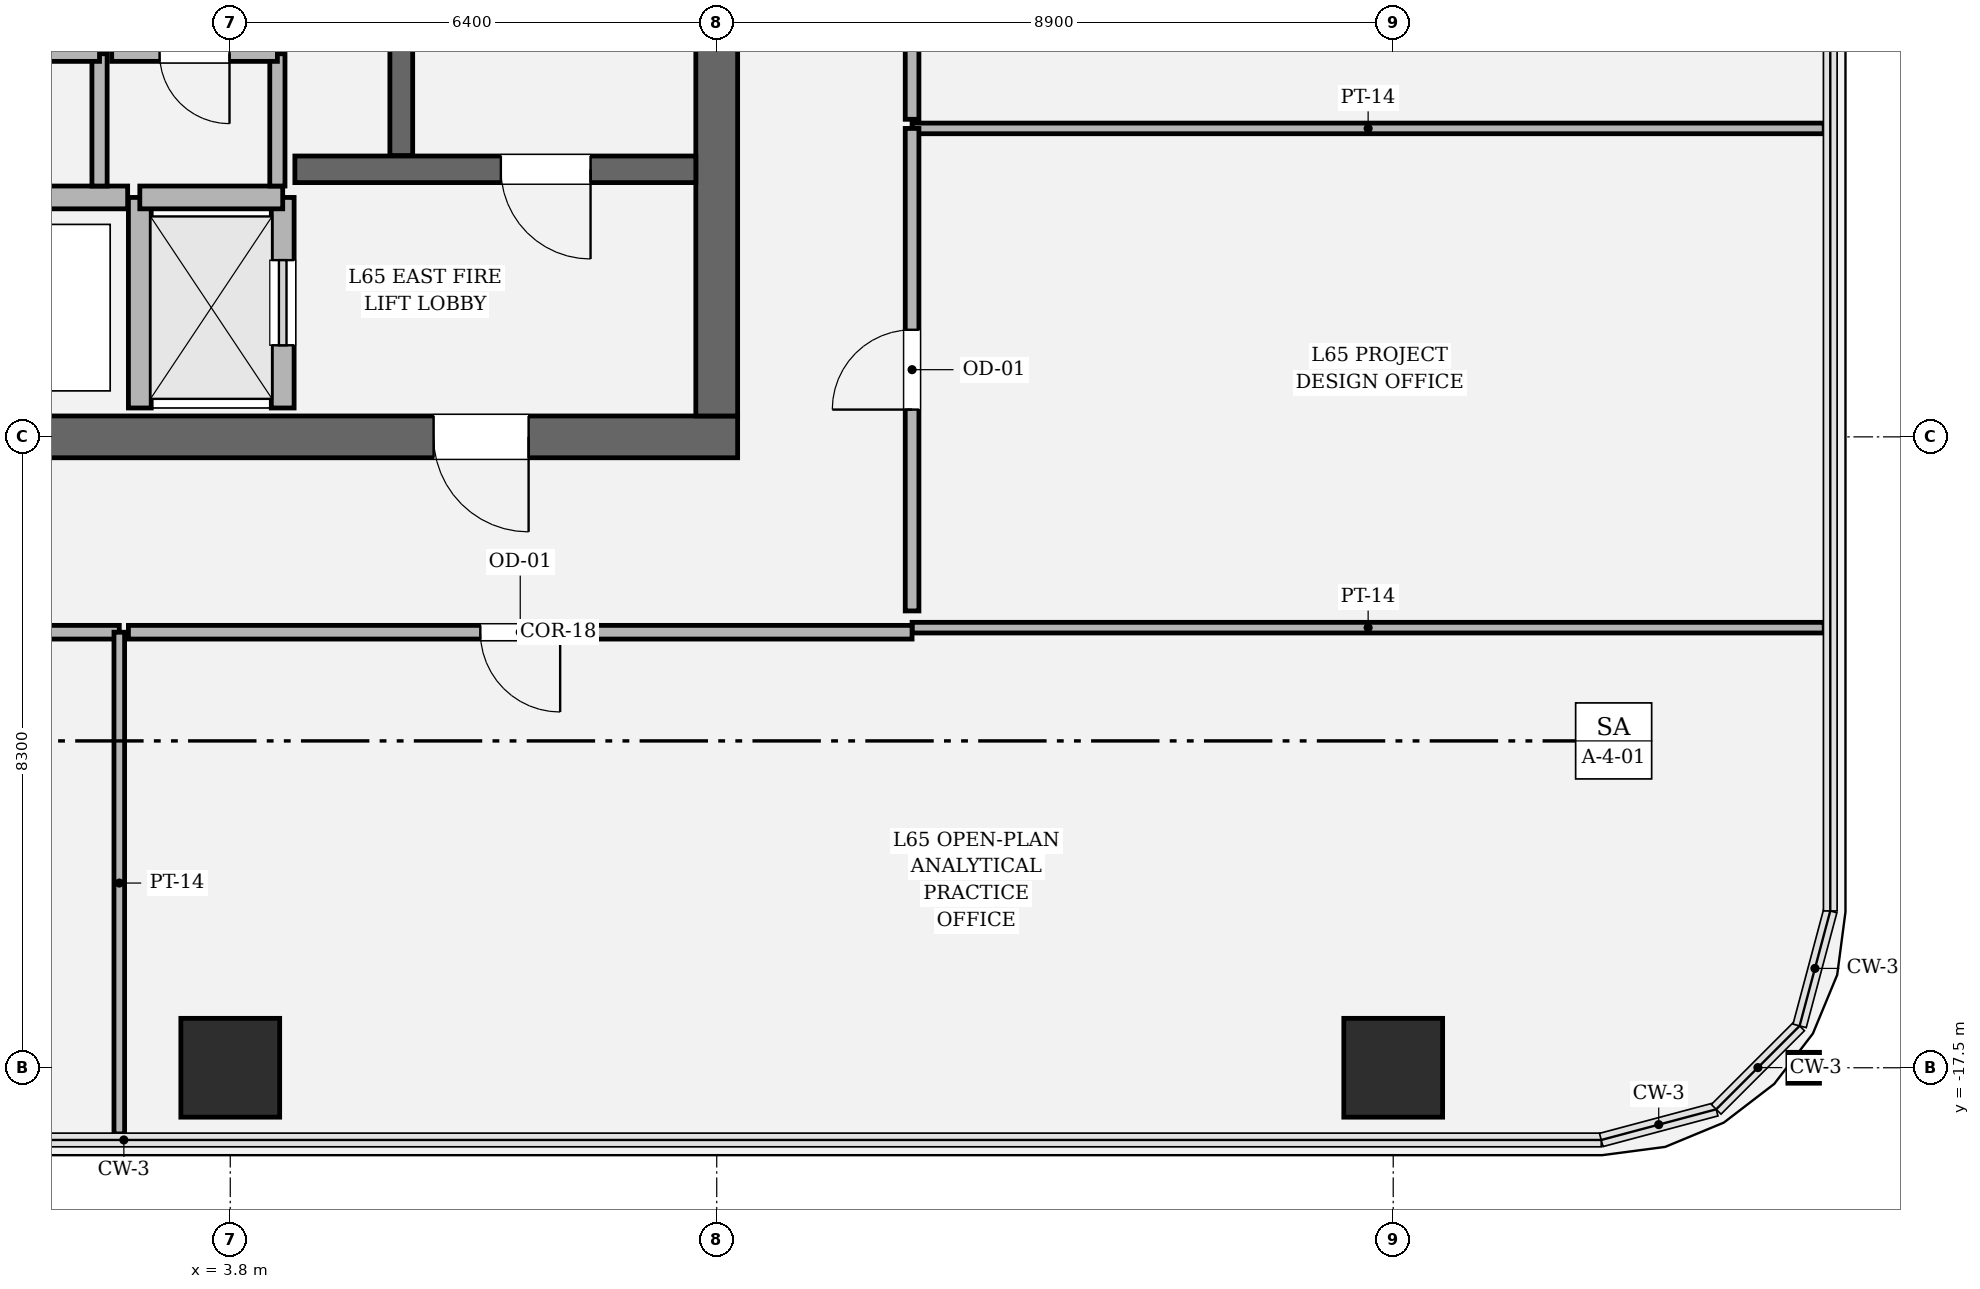
"""IFC4 building model, lengths in metres.
Left out: names, types, materials, properties, quantities, classifications, styles, units other than length and angle.
Written with IfcOpenShell. Run it as: python <this file> out.ifc"""

import sys

from ifc_helpers import new_model, si_unit, direction, frame, frame_2d, origin, origin_2d, place, context, subcontext, project, spatial, rectangle, hollow_rectangle, i_section, extrude, element, fill, save


model = new_model("IFC4")
c1 = context("Model", 3, precision=1e-05, world=origin(), true_north=direction((0.0, 1.0)))
c2 = subcontext(c1, "Body", "Model", "MODEL_VIEW")
j1 = project(units=[si_unit("LENGTHUNIT", "METRE"), si_unit("PLANEANGLEUNIT", "RADIAN")], contexts=[c1])
p1 = place(None, origin())
s1 = spatial("IfcSite", under=j1, at=p1, CompositionType="ELEMENT")
p2 = place(p1, origin())
s2 = spatial("IfcBuilding", under=s1, at=p2, CompositionType="ELEMENT")
p3 = place(p2, frame((0.0, 0.0, 275.7)))
s3 = spatial("IfcBuildingStorey", under=s2, at=p3, CompositionType="ELEMENT", Elevation=275.7)
p4 = place(p3, frame((10.475, -9.2, 0.0), z_axis=(0.0, 0.0, 1.0), x_axis=(-1.0, 0.0, 0.0)))
e1 = element("IfcWall", 1, at=p4, inside=s3, PredefinedType="SHEAR", context=c2, shape_type="SweptSolid", body=[
    extrude(rectangle(XDim=20.95, YDim=0.55, at=frame_2d((10.475, 0.0))), origin(), (0.0, 0.0, 1.0), 4.05),
])
p5 = place(p4, frame((2.75, 0.0, 0.0)))
e2 = element("IfcOpeningElement", 2, at=p5, cuts=e1, PredefinedType="OPENING", context=c2, shape_type="SweptSolid", body=[
    extrude(rectangle(XDim=1.25, YDim=2.25, at=frame_2d((0.625, 1.125))), frame((0.0, 0.285, 0.0), z_axis=(0.0, -1.0, 0.0), x_axis=(1.0, 0.0, 0.0)), (0.0, 0.0, 1.0), 0.57),
])
p6 = place(p4, frame((16.95, 0.0, 0.0)))
e3 = element("IfcOpeningElement", 3, at=p6, cuts=e1, PredefinedType="OPENING", context=c2, shape_type="SweptSolid", body=[
    extrude(rectangle(XDim=1.25, YDim=2.25, at=frame_2d((0.625, 1.125))), frame((0.0, 0.285, 0.0), z_axis=(0.0, -1.0, 0.0), x_axis=(1.0, 0.0, 0.0)), (0.0, 0.0, 1.0), 0.57),
])
p7 = place(p3, frame((10.2, 8.925, 0.0), z_axis=(0.0, 0.0, 1.0), x_axis=(0.0, -1.0, 0.0)))
e4 = element("IfcWall", 4, at=p7, inside=s3, PredefinedType="SHEAR", context=c2, shape_type="SweptSolid", body=[
    extrude(rectangle(XDim=17.85, YDim=0.55, at=frame_2d((8.925, 0.0))), origin(), (0.0, 0.0, 1.0), 4.05),
])
p8 = place(p7, frame((3.955, 0.0, 0.0)))
e5 = element("IfcOpeningElement", 5, at=p8, cuts=e4, PredefinedType="OPENING", context=c2, shape_type="SweptSolid", body=[
    extrude(rectangle(XDim=1.18, YDim=2.2, at=frame_2d((0.59, 1.1))), frame((0.0, 0.285, 0.0), z_axis=(0.0, -1.0, 0.0), x_axis=(1.0, 0.0, 0.0)), (0.0, 0.0, 1.0), 0.57),
])
p9 = place(p3, frame((6.05, 3.45, 0.0), z_axis=(0.0, 0.0, 1.0), x_axis=(0.0, -1.0, 0.0)))
e6 = element("IfcWall", 6, at=p9, inside=s3, PredefinedType="SOLIDWALL", context=c2, shape_type="SweptSolid", body=[
    extrude(rectangle(XDim=8.95, YDim=0.3, at=frame_2d((4.475, 0.0))), origin(), (0.0, 0.0, 1.0), 4.05),
])
p10 = place(p3, frame((4.65, -5.68, 0.0), z_axis=(0.0, 0.0, 1.0), x_axis=(1.0, 0.0, 0.0)))
e7 = element("IfcWall", 7, at=p10, inside=s3, PredefinedType="SOLIDWALL", context=c2, shape_type="SweptSolid", body=[
    extrude(rectangle(XDim=5.275, YDim=0.35, at=frame_2d((2.638, 0.0))), origin(), (0.0, 0.0, 1.0), 4.05),
])
p11 = place(p10, frame((2.71, 0.0, 0.0)))
e8 = element("IfcOpeningElement", 8, at=p11, cuts=e7, PredefinedType="OPENING", context=c2, shape_type="SweptSolid", body=[
    extrude(rectangle(XDim=1.18, YDim=2.2, at=frame_2d((0.59, 1.1))), frame((0.0, 0.185, 0.0), z_axis=(0.0, -1.0, 0.0), x_axis=(1.0, 0.0, 0.0)), (0.0, 0.0, 1.0), 0.37),
])
for number, where, z_axis, x_axis in (
    (9, (3.8, -17.5, 0.0), (0.0, 0.0, 1.0), (1.0, 0.0, 0.0)),
    (10, (19.1, -17.5, 0.0), (0.0, 0.0, 1.0), (1.0, 0.0, 0.0)),
):
    element("IfcColumn", number, at=place(p3, frame(where, z_axis=z_axis, x_axis=x_axis)), inside=s3, PredefinedType="COLUMN", context=c2, shape_type="SweptSolid", body=[
        extrude(hollow_rectangle(XDim=1.3, YDim=1.3, WallThickness=0.038, at=origin_2d()), origin(), (0.0, 0.0, 1.0), 4.05),
    ])
p12 = place(p3, frame((24.5, -17.5, 0.0), z_axis=(0.0, 0.0, 1.0), x_axis=(0.0, 1.0, 0.0)))
e11 = element("IfcColumn", 11, at=p12, inside=s3, PredefinedType="COLUMN", context=c2, shape_type="SweptSolid", body=[
    extrude(i_section(OverallWidth=0.406, OverallDepth=0.416, WebThickness=0.029, FlangeThickness=0.048, FilletRadius=0.018, at=origin_2d()), origin(), (0.0, 0.0, 1.0), 4.048),
])
p13 = place(p3, frame((4.49, -8.82, 0.0), z_axis=(0.0, 0.0, 1.0), x_axis=(0.0, 1.0, 0.0)))
e12 = element("IfcWall", 12, at=p13, inside=s3, PredefinedType="SOLIDWALL", context=c2, shape_type="SweptSolid", body=[
    extrude(rectangle(XDim=2.77, YDim=0.3, at=frame_2d((1.385, 0.0))), origin(), (0.0, 0.0, 1.0), 3.85),
])
p14 = place(p13, frame((0.825, 0.0, 0.0)))
e13 = element("IfcOpeningElement", 13, at=p14, cuts=e12, PredefinedType="OPENING", context=c2, shape_type="SweptSolid", body=[
    extrude(rectangle(XDim=1.12, YDim=2.25, at=frame_2d((0.56, 1.125))), frame((0.0, 0.16, 0.0), z_axis=(0.0, -1.0, 0.0), x_axis=(1.0, 0.0, 0.0)), (0.0, 0.0, 1.0), 0.32),
])
p15 = place(p3, frame((2.61, -8.82, 0.0), z_axis=(0.0, 0.0, 1.0), x_axis=(0.0, 1.0, 0.0)))
e14 = element("IfcWall", 14, at=p15, inside=s3, PredefinedType="SOLIDWALL", context=c2, shape_type="SweptSolid", body=[
    extrude(rectangle(XDim=2.77, YDim=0.3, at=frame_2d((1.385, 0.0))), origin(), (0.0, 0.0, 1.0), 3.85),
])
p16 = place(p3, frame((2.61, -6.05, 0.0), z_axis=(0.0, 0.0, 1.0), x_axis=(1.0, 0.0, 0.0)))
e15 = element("IfcWall", 15, at=p16, inside=s3, PredefinedType="SOLIDWALL", context=c2, shape_type="SweptSolid", body=[
    extrude(rectangle(XDim=1.88, YDim=0.3, at=frame_2d((0.94, 0.0))), origin(), (0.0, 0.0, 1.0), 3.85),
])
p17 = place(p3, frame((-2.45, -6.05, 0.0), z_axis=(0.0, 0.0, 1.0), x_axis=(1.0, 0.0, 0.0)))
e16 = element("IfcWall", 16, at=p17, inside=s3, PredefinedType="SOLIDWALL", context=c2, shape_type="SweptSolid", body=[
    extrude(rectangle(XDim=4.9, YDim=0.3, at=frame_2d((2.45, 0.0))), origin(), (0.0, 0.0, 1.0), 3.85),
])
p18 = place(p3, frame((2.08, -5.9, 0.0), z_axis=(0.0, 0.0, 1.0), x_axis=(0.0, 1.0, 0.0)))
e17 = element("IfcWall", 17, at=p18, inside=s3, PredefinedType="SOLIDWALL", context=c2, shape_type="SweptSolid", body=[
    extrude(rectangle(XDim=1.74, YDim=0.2, at=frame_2d((0.87, 0.0))), origin(), (0.0, 0.0, 1.0), 3.85),
])
p19 = place(p3, frame((2.08, -4.16, 0.0), z_axis=(0.0, 0.0, 1.0), x_axis=(-1.0, 0.0, 0.0)))
e18 = element("IfcWall", 18, at=p19, inside=s3, PredefinedType="SOLIDWALL", context=c2, shape_type="SweptSolid", body=[
    extrude(rectangle(XDim=3.17, YDim=0.2, at=frame_2d((1.585, 0.0))), origin(), (0.0, 0.0, 1.0), 3.85),
])
p20 = place(p19, frame((1.11, 0.0, 0.0)))
e19 = element("IfcOpeningElement", 19, at=p20, cuts=e18, PredefinedType="OPENING", context=c2, shape_type="SweptSolid", body=[
    extrude(rectangle(XDim=0.95, YDim=2.15, at=frame_2d((0.475, 1.075))), frame((0.0, 0.11, 0.0), z_axis=(0.0, -1.0, 0.0), x_axis=(1.0, 0.0, 0.0)), (0.0, 0.0, 1.0), 0.22),
])
p21 = place(p3, frame((4.42, -5.9, 0.0), z_axis=(0.0, 0.0, 1.0), x_axis=(0.0, 1.0, 0.0)))
e20 = element("IfcWall", 20, at=p21, inside=s3, PredefinedType="SOLIDWALL", context=c2, shape_type="SweptSolid", body=[
    extrude(rectangle(XDim=1.74, YDim=0.2, at=frame_2d((0.87, 0.0))), origin(), (0.0, 0.0, 1.0), 3.85),
])
p22 = place(p3, frame((4.42, -4.16, 0.0), z_axis=(0.0, 0.0, 1.0), x_axis=(-1.0, 0.0, 0.0)))
e21 = element("IfcWall", 21, at=p22, inside=s3, PredefinedType="SOLIDWALL", context=c2, shape_type="SweptSolid", body=[
    extrude(rectangle(XDim=2.18, YDim=0.2, at=frame_2d((1.09, 0.0))), origin(), (0.0, 0.0, 1.0), 3.85),
])
p23 = place(p22, frame((0.63, 0.0, 0.0)))
e22 = element("IfcOpeningElement", 22, at=p23, cuts=e21, PredefinedType="OPENING", context=c2, shape_type="SweptSolid", body=[
    extrude(rectangle(XDim=0.92, YDim=2.1, at=frame_2d((0.46, 1.05))), frame((0.0, 0.11, 0.0), z_axis=(0.0, -1.0, 0.0), x_axis=(1.0, 0.0, 0.0)), (0.0, 0.0, 1.0), 0.22),
])
p24 = place(p3, frame((-12.77, -11.77, 0.0), z_axis=(0.0, 0.0, 1.0), x_axis=(1.0, 0.0, 0.0)))
e23 = element("IfcWall", 23, at=p24, inside=s3, PredefinedType="PARTITIONING", context=c2, shape_type="SweptSolid", body=[
    extrude(rectangle(XDim=15.11, YDim=0.18, at=frame_2d((7.555, 0.0))), origin(), (0.0, 0.0, 1.0), 3.244),
])
p25 = place(p24, frame((7.03, 0.0, 0.0)))
e24 = element("IfcOpeningElement", 24, at=p25, cuts=e23, PredefinedType="OPENING", context=c2, shape_type="SweptSolid", body=[
    extrude(rectangle(XDim=1.05, YDim=2.2, at=frame_2d((0.525, 1.1))), frame((0.0, 0.1, 0.0), z_axis=(0.0, -1.0, 0.0), x_axis=(1.0, 0.0, 0.0)), (0.0, 0.0, 1.0), 0.2),
])
p26 = place(p3, frame((2.34, -11.77, 0.0), z_axis=(0.0, 0.0, 1.0), x_axis=(0.0, -1.0, 0.0)))
e25 = element("IfcWall", 25, at=p26, inside=s3, PredefinedType="PARTITIONING", context=c2, shape_type="SweptSolid", body=[
    extrude(rectangle(XDim=6.6, YDim=0.14, at=frame_2d((3.3, 0.0))), origin(), (0.0, 0.0, 1.0), 3.244),
])
p27 = place(p3, frame((12.77, -11.71, 0.0), z_axis=(0.0, 0.0, 1.0), x_axis=(1.0, 0.0, 0.0)))
e26 = element("IfcWall", 26, at=p27, inside=s3, PredefinedType="PARTITIONING", context=c2, shape_type="SweptSolid", body=[
    extrude(rectangle(XDim=12.0, YDim=0.14, at=frame_2d((6.0, 0.0))), origin(), (0.0, 0.0, 1.0), 2.564),
])
p28 = place(p3, frame((2.46, -11.77, 0.0), z_axis=(0.0, 0.0, 1.0), x_axis=(1.0, 0.0, 0.0)))
e27 = element("IfcWall", 27, at=p28, inside=s3, PredefinedType="PARTITIONING", context=c2, shape_type="SweptSolid", body=[
    extrude(rectangle(XDim=10.31, YDim=0.18, at=frame_2d((5.155, 0.0))), origin(), (0.0, 0.0, 1.0), 3.244),
])
p29 = place(p28, frame((4.63, 0.0, 0.0)))
e28 = element("IfcOpeningElement", 28, at=p29, cuts=e27, PredefinedType="OPENING", context=c2, shape_type="SweptSolid", body=[
    extrude(rectangle(XDim=1.05, YDim=2.2, at=frame_2d((0.525, 1.1))), frame((0.0, 0.1, 0.0), z_axis=(0.0, -1.0, 0.0), x_axis=(1.0, 0.0, 0.0)), (0.0, 0.0, 1.0), 0.2),
])
p30 = place(p3, frame((12.77, -5.142, 0.0), z_axis=(0.0, 0.0, 1.0), x_axis=(1.0, 0.0, 0.0)))
e29 = element("IfcWall", 29, at=p30, inside=s3, PredefinedType="PARTITIONING", context=c2, shape_type="SweptSolid", body=[
    extrude(rectangle(XDim=12.0, YDim=0.14, at=frame_2d((6.0, 0.0))), origin(), (0.0, 0.0, 1.0), 2.564),
])
p31 = place(p3, frame((12.77, -11.49, 0.0), z_axis=(0.0, 0.0, 1.0), x_axis=(0.0, 1.0, 0.0)))
e30 = element("IfcWall", 30, at=p31, inside=s3, PredefinedType="PARTITIONING", context=c2, shape_type="SweptSolid", body=[
    extrude(rectangle(XDim=6.348, YDim=0.18, at=frame_2d((3.174, 0.0))), origin(), (0.0, 0.0, 1.0), 3.244),
])
p32 = place(p31, frame((2.649, 0.0, 0.0)))
e31 = element("IfcOpeningElement", 31, at=p32, cuts=e30, PredefinedType="OPENING", context=c2, shape_type="SweptSolid", body=[
    extrude(rectangle(XDim=1.05, YDim=2.2, at=frame_2d((0.525, 1.1))), frame((0.0, 0.1, 0.0), z_axis=(0.0, -1.0, 0.0), x_axis=(1.0, 0.0, 0.0)), (0.0, 0.0, 1.0), 0.2),
])
p33 = place(p3, frame((12.77, -5.022, 0.0), z_axis=(0.0, 0.0, 1.0), x_axis=(0.0, 1.0, 0.0)))
e32 = element("IfcWall", 32, at=p33, inside=s3, PredefinedType="PARTITIONING", context=c2, shape_type="SweptSolid", body=[
    extrude(rectangle(XDim=4.962, YDim=0.18, at=frame_2d((2.481, 0.0))), origin(), (0.0, 0.0, 1.0), 3.244),
])
p34 = place(p33, frame((1.956, 0.0, 0.0)))
e33 = element("IfcOpeningElement", 33, at=p34, cuts=e32, PredefinedType="OPENING", context=c2, shape_type="SweptSolid", body=[
    extrude(rectangle(XDim=1.05, YDim=2.2, at=frame_2d((0.525, 1.1))), frame((0.0, 0.1, 0.0), z_axis=(0.0, -1.0, 0.0), x_axis=(1.0, 0.0, 0.0)), (0.0, 0.0, 1.0), 0.2),
])
p35 = place(p11, origin())
e34 = element("IfcDoor", 34, at=p35, inside=s3, OperationType="SINGLE_SWING_RIGHT", PredefinedType="DOOR", context=c2, shape_type="SweptSolid", body=[
    extrude(rectangle(XDim=1.18, YDim=2.2, at=frame_2d((0.59, 1.1))), frame((0.0, 0.025, 0.0), z_axis=(0.0, -1.0, 0.0), x_axis=(1.0, 0.0, 0.0)), (0.0, 0.0, 1.0), 0.05),
])
fill(e8, e34)
p36 = place(p5, origin())
e35 = element("IfcDoor", 35, at=p36, inside=s3, OperationType="SINGLE_SWING_LEFT", PredefinedType="DOOR", context=c2, shape_type="SweptSolid", body=[
    extrude(rectangle(XDim=1.25, YDim=2.25, at=frame_2d((0.625, 1.125))), frame((0.0, 0.025, 0.0), z_axis=(0.0, -1.0, 0.0), x_axis=(1.0, 0.0, 0.0)), (0.0, 0.0, 1.0), 0.05),
])
fill(e2, e35)
p37 = place(p14, origin())
e36 = element("IfcDoor", 36, at=p37, inside=s3, OperationType="SLIDING_TO_RIGHT", PredefinedType="DOOR", context=c2, shape_type="SweptSolid", body=[
    extrude(rectangle(XDim=1.12, YDim=2.25, at=frame_2d((0.56, 1.125))), frame((0.0, 0.025, 0.0), z_axis=(0.0, -1.0, 0.0), x_axis=(1.0, 0.0, 0.0)), (0.0, 0.0, 1.0), 0.05),
])
fill(e13, e36)
p38 = place(p23, origin())
e37 = element("IfcDoor", 37, at=p38, inside=s3, OperationType="SINGLE_SWING_LEFT", PredefinedType="DOOR", context=c2, shape_type="SweptSolid", body=[
    extrude(rectangle(XDim=0.92, YDim=2.1, at=frame_2d((0.46, 1.05))), frame((0.0, 0.025, 0.0), z_axis=(0.0, -1.0, 0.0), x_axis=(1.0, 0.0, 0.0)), (0.0, 0.0, 1.0), 0.05),
])
fill(e22, e37)
p39 = place(p29, origin())
e38 = element("IfcDoor", 38, at=p39, inside=s3, OperationType="SINGLE_SWING_RIGHT", PredefinedType="DOOR", context=c2, shape_type="SweptSolid", body=[
    extrude(rectangle(XDim=1.05, YDim=2.2, at=frame_2d((0.525, 1.1))), frame((0.0, 0.025, 0.0), z_axis=(0.0, -1.0, 0.0), x_axis=(1.0, 0.0, 0.0)), (0.0, 0.0, 1.0), 0.05),
])
fill(e28, e38)
p40 = place(p32, origin())
e39 = element("IfcDoor", 39, at=p40, inside=s3, OperationType="SINGLE_SWING_LEFT", PredefinedType="DOOR", context=c2, shape_type="SweptSolid", body=[
    extrude(rectangle(XDim=1.05, YDim=2.2, at=frame_2d((0.525, 1.1))), frame((0.0, 0.025, 0.0), z_axis=(0.0, -1.0, 0.0), x_axis=(1.0, 0.0, 0.0)), (0.0, 0.0, 1.0), 0.05),
])
fill(e31, e39)
save(model, sys.argv[1])
